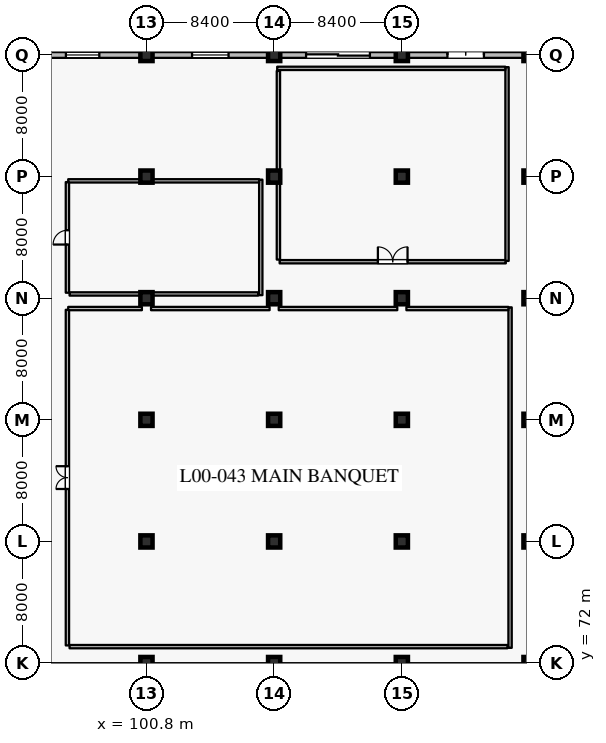
"""IFC4 building model, lengths in metres.
Left out: names, types, materials, properties, quantities, classifications, styles, units other than length and angle.
Written with IfcOpenShell. Run it as: python <this file> out.ifc"""

import sys

from ifc_helpers import new_model, si_unit, direction, frame, frame_2d, origin, origin_2d, place, context, subcontext, project, spatial, rectangle, extrude, element, fill, save


model = new_model("IFC4")
c1 = context("Model", 3, precision=1e-05, world=origin(), true_north=direction((0.0, 1.0)))
c2 = subcontext(c1, "Body", "Model", "MODEL_VIEW")
j1 = project(units=[si_unit("LENGTHUNIT", "METRE"), si_unit("PLANEANGLEUNIT", "RADIAN")], contexts=[c1])
p1 = place(None, origin())
s1 = spatial("IfcSite", under=j1, at=p1, CompositionType="ELEMENT")
p2 = place(p1, origin())
s2 = spatial("IfcBuilding", under=s1, at=p2, CompositionType="ELEMENT")
p3 = place(p2, origin())
s3 = spatial("IfcBuildingStorey", under=s2, at=p3, CompositionType="ELEMENT", Elevation=0.0)
for number, where, z_axis, x_axis in (
    (1, (100.8, 72.0, 0.0), (0.0, 0.0, 1.0), (1.0, 0.0, 0.0)),
    (2, (100.8, 80.0, 0.0), (0.0, 0.0, 1.0), (1.0, 0.0, 0.0)),
    (3, (100.8, 88.0, 0.0), (0.0, 0.0, 1.0), (1.0, 0.0, 0.0)),
    (4, (100.8, 96.0, 0.0), (0.0, 0.0, 1.0), (1.0, 0.0, 0.0)),
    (5, (100.8, 104.0, 0.0), (0.0, 0.0, 1.0), (1.0, 0.0, 0.0)),
    (6, (100.8, 112.0, 0.0), (0.0, 0.0, 1.0), (1.0, 0.0, 0.0)),
    (7, (109.2, 72.0, 0.0), (0.0, 0.0, 1.0), (1.0, 0.0, 0.0)),
    (8, (109.2, 80.0, 0.0), (0.0, 0.0, 1.0), (1.0, 0.0, 0.0)),
    (9, (109.2, 88.0, 0.0), (0.0, 0.0, 1.0), (1.0, 0.0, 0.0)),
    (10, (109.2, 96.0, 0.0), (0.0, 0.0, 1.0), (1.0, 0.0, 0.0)),
    (11, (109.2, 104.0, 0.0), (0.0, 0.0, 1.0), (1.0, 0.0, 0.0)),
    (12, (109.2, 112.0, 0.0), (0.0, 0.0, 1.0), (1.0, 0.0, 0.0)),
    (13, (117.6, 72.0, 0.0), (0.0, 0.0, 1.0), (1.0, 0.0, 0.0)),
    (14, (117.6, 80.0, 0.0), (0.0, 0.0, 1.0), (1.0, 0.0, 0.0)),
    (15, (117.6, 88.0, 0.0), (0.0, 0.0, 1.0), (1.0, 0.0, 0.0)),
    (16, (117.6, 96.0, 0.0), (0.0, 0.0, 1.0), (1.0, 0.0, 0.0)),
    (17, (117.6, 104.0, 0.0), (0.0, 0.0, 1.0), (1.0, 0.0, 0.0)),
    (18, (117.6, 112.0, 0.0), (0.0, 0.0, 1.0), (1.0, 0.0, 0.0)),
    (19, (126.0, 72.0, 0.0), (0.0, 0.0, 1.0), (1.0, 0.0, 0.0)),
    (20, (126.0, 80.0, 0.0), (0.0, 0.0, 1.0), (1.0, 0.0, 0.0)),
    (21, (126.0, 88.0, 0.0), (0.0, 0.0, 1.0), (1.0, 0.0, 0.0)),
    (22, (126.0, 96.0, 0.0), (0.0, 0.0, 1.0), (1.0, 0.0, 0.0)),
    (23, (126.0, 104.0, 0.0), (0.0, 0.0, 1.0), (1.0, 0.0, 0.0)),
    (24, (126.0, 112.0, 0.0), (0.0, 0.0, 1.0), (1.0, 0.0, 0.0)),
):
    element("IfcColumn", number, at=place(p3, frame(where, z_axis=z_axis, x_axis=x_axis)), inside=s3, PredefinedType="COLUMN", context=c2, shape_type="SweptSolid", body=[
        extrude(rectangle(XDim=0.8, YDim=0.8, at=origin_2d()), origin(), (0.0, 0.0, 1.0), 6.0),
    ])
p4 = place(p3, frame((92.8, 112.0, 0.0), z_axis=(0.0, 0.0, 1.0), x_axis=(1.0, 0.0, 0.0)))
e25 = element("IfcWall", 25, at=p4, inside=s3, PredefinedType="SOLIDWALL", context=c2, shape_type="SweptSolid", body=[
    extrude(rectangle(XDim=7.6, YDim=0.38, at=frame_2d((3.8, 0.0))), origin(), (0.0, 0.0, 1.0), 5.0),
])
p5 = place(p4, frame((2.7, 0.0, 1.05)))
e26 = element("IfcOpeningElement", 26, at=p5, cuts=e25, PredefinedType="OPENING", context=c2, shape_type="SweptSolid", body=[
    extrude(rectangle(XDim=2.2, YDim=1.75, at=frame_2d((1.1, 0.875))), frame((0.0, 0.2, 0.0), z_axis=(0.0, -1.0, 0.0), x_axis=(1.0, 0.0, 0.0)), (0.0, 0.0, 1.0), 0.4),
])
p6 = place(p3, frame((101.2, 112.0, 0.0), z_axis=(0.0, 0.0, 1.0), x_axis=(1.0, 0.0, 0.0)))
e27 = element("IfcWall", 27, at=p6, inside=s3, PredefinedType="SOLIDWALL", context=c2, shape_type="SweptSolid", body=[
    extrude(rectangle(XDim=7.6, YDim=0.38, at=frame_2d((3.8, 0.0))), origin(), (0.0, 0.0, 1.0), 5.0),
])
p7 = place(p6, frame((2.6, 0.0, 1.05)))
e28 = element("IfcOpeningElement", 28, at=p7, cuts=e27, PredefinedType="OPENING", context=c2, shape_type="SweptSolid", body=[
    extrude(rectangle(XDim=2.4, YDim=1.65, at=frame_2d((1.2, 0.825))), frame((0.0, 0.2, 0.0), z_axis=(0.0, -1.0, 0.0), x_axis=(1.0, 0.0, 0.0)), (0.0, 0.0, 1.0), 0.4),
])
p8 = place(p3, frame((109.6, 112.0, 0.0), z_axis=(0.0, 0.0, 1.0), x_axis=(1.0, 0.0, 0.0)))
e29 = element("IfcWall", 29, at=p8, inside=s3, PredefinedType="SOLIDWALL", context=c2, shape_type="SweptSolid", body=[
    extrude(rectangle(XDim=7.6, YDim=0.38, at=frame_2d((3.8, 0.0))), origin(), (0.0, 0.0, 1.0), 5.0),
])
p9 = place(p8, frame((1.7, 0.0, 0.0)))
e30 = element("IfcOpeningElement", 30, at=p9, cuts=e29, PredefinedType="OPENING", context=c2, shape_type="SweptSolid", body=[
    extrude(rectangle(XDim=4.2, YDim=4.2, at=frame_2d((2.1, 2.1))), frame((0.0, 0.2, 0.0), z_axis=(0.0, -1.0, 0.0), x_axis=(1.0, 0.0, 0.0)), (0.0, 0.0, 1.0), 0.4),
])
p10 = place(p3, frame((118.0, 112.0, 0.0), z_axis=(0.0, 0.0, 1.0), x_axis=(1.0, 0.0, 0.0)))
e31 = element("IfcWall", 31, at=p10, inside=s3, PredefinedType="SOLIDWALL", context=c2, shape_type="SweptSolid", body=[
    extrude(rectangle(XDim=7.6, YDim=0.38, at=frame_2d((3.8, 0.0))), origin(), (0.0, 0.0, 1.0), 5.0),
])
p11 = place(p10, frame((2.6, 0.0, 0.0)))
e32 = element("IfcOpeningElement", 32, at=p11, cuts=e31, PredefinedType="OPENING", context=c2, shape_type="SweptSolid", body=[
    extrude(rectangle(XDim=2.4, YDim=2.6, at=frame_2d((1.2, 1.3))), frame((0.0, 0.2, 0.0), z_axis=(0.0, -1.0, 0.0), x_axis=(1.0, 0.0, 0.0)), (0.0, 0.0, 1.0), 0.4),
])
p12 = place(p3, frame((95.6, 73.16, 0.0), z_axis=(0.0, 0.0, 1.0), x_axis=(0.0, 1.0, 0.0)))
e33 = element("IfcWall", 33, at=p12, inside=s3, PredefinedType="PARTITIONING", context=c2, shape_type="SweptSolid", body=[
    extrude(rectangle(XDim=22.08, YDim=0.22, at=frame_2d((11.04, 0.0))), origin(), (0.0, 0.0, 1.0), 5.675),
])
p13 = place(p12, frame((10.29, 0.0, 0.0)))
e34 = element("IfcOpeningElement", 34, at=p13, cuts=e33, PredefinedType="OPENING", context=c2, shape_type="SweptSolid", body=[
    extrude(rectangle(XDim=1.5, YDim=2.3, at=frame_2d((0.75, 1.15))), frame((0.0, 0.12, 0.0), z_axis=(0.0, -1.0, 0.0), x_axis=(1.0, 0.0, 0.0)), (0.0, 0.0, 1.0), 0.24),
])
p14 = place(p3, frame((95.74, 73.08, 0.0), z_axis=(0.0, 0.0, 1.0), x_axis=(1.0, 0.0, 0.0)))
e35 = element("IfcWall", 35, at=p14, inside=s3, PredefinedType="PARTITIONING", context=c2, shape_type="SweptSolid", body=[
    extrude(rectangle(XDim=28.81, YDim=0.22, at=frame_2d((14.405, 0.0))), origin(), (0.0, 0.0, 1.0), 5.675),
])
p15 = place(p3, frame((95.6, 96.36, 0.0), z_axis=(0.0, 0.0, 1.0), x_axis=(0.0, 1.0, 0.0)))
e36 = element("IfcWall", 36, at=p15, inside=s3, PredefinedType="PARTITIONING", context=c2, shape_type="SweptSolid", body=[
    extrude(rectangle(XDim=7.28, YDim=0.22, at=frame_2d((3.64, 0.0))), origin(), (0.0, 0.0, 1.0), 5.675),
])
p16 = place(p15, frame((3.17, 0.0, 0.0)))
e37 = element("IfcOpeningElement", 37, at=p16, cuts=e36, PredefinedType="OPENING", context=c2, shape_type="SweptSolid", body=[
    extrude(rectangle(XDim=0.94, YDim=2.15, at=frame_2d((0.47, 1.075))), frame((0.0, 0.12, 0.0), z_axis=(0.0, -1.0, 0.0), x_axis=(1.0, 0.0, 0.0)), (0.0, 0.0, 1.0), 0.24),
])
p17 = place(p3, frame((95.74, 96.28, 0.0), z_axis=(0.0, 0.0, 1.0), x_axis=(1.0, 0.0, 0.0)))
e38 = element("IfcWall", 38, at=p17, inside=s3, PredefinedType="PARTITIONING", context=c2, shape_type="SweptSolid", body=[
    extrude(rectangle(XDim=12.41, YDim=0.22, at=frame_2d((6.205, 0.0))), origin(), (0.0, 0.0, 1.0), 4.85),
])
p18 = place(p3, frame((109.56, 98.4, 0.0), z_axis=(0.0, 0.0, 1.0), x_axis=(1.0, 0.0, 0.0)))
e39 = element("IfcWall", 39, at=p18, inside=s3, PredefinedType="PARTITIONING", context=c2, shape_type="SweptSolid", body=[
    extrude(rectangle(XDim=14.88, YDim=0.22, at=frame_2d((7.44, 0.0))), origin(), (0.0, 0.0, 1.0), 5.675),
])
p19 = place(p18, frame((6.465, 0.0, 0.0)))
e40 = element("IfcOpeningElement", 40, at=p19, cuts=e39, PredefinedType="OPENING", context=c2, shape_type="SweptSolid", body=[
    extrude(rectangle(XDim=1.95, YDim=2.45, at=frame_2d((0.975, 1.225))), frame((0.0, 0.12, 0.0), z_axis=(0.0, -1.0, 0.0), x_axis=(1.0, 0.0, 0.0)), (0.0, 0.0, 1.0), 0.24),
])
p20 = place(p3, frame((109.48, 98.54, 0.0), z_axis=(0.0, 0.0, 1.0), x_axis=(0.0, 1.0, 0.0)))
e41 = element("IfcWall", 41, at=p20, inside=s3, PredefinedType="PARTITIONING", context=c2, shape_type="SweptSolid", body=[
    extrude(rectangle(XDim=12.41, YDim=0.22, at=frame_2d((6.205, 0.0))), origin(), (0.0, 0.0, 1.0), 5.675),
])
p21 = place(p3, frame((124.72, 73.0, 0.0), z_axis=(0.0, 0.0, 1.0), x_axis=(0.0, 1.0, 0.0)))
e42 = element("IfcWall", 42, at=p21, inside=s3, PredefinedType="PARTITIONING", context=c2, shape_type="SweptSolid", body=[
    extrude(rectangle(XDim=22.4, YDim=0.22, at=frame_2d((11.2, 0.0))), origin(), (0.0, 0.0, 1.0), 5.675),
])
p22 = place(p3, frame((95.652, 95.32, 0.0), z_axis=(0.0, 0.0, 1.0), x_axis=(1.0, 0.0, 0.0)))
e43 = element("IfcWall", 43, at=p22, inside=s3, PredefinedType="PARTITIONING", context=c2, shape_type="SweptSolid", body=[
    extrude(rectangle(XDim=4.848, YDim=0.22, at=frame_2d((2.424, 0.0))), origin(), (0.0, 0.0, 1.0), 5.675),
])
p23 = place(p3, frame((101.1, 95.32, 0.0), z_axis=(0.0, 0.0, 1.0), x_axis=(1.0, 0.0, 0.0)))
e44 = element("IfcWall", 44, at=p23, inside=s3, PredefinedType="PARTITIONING", context=c2, shape_type="SweptSolid", body=[
    extrude(rectangle(XDim=7.8, YDim=0.22, at=frame_2d((3.9, 0.0))), origin(), (0.0, 0.0, 1.0), 5.675),
])
p24 = place(p3, frame((109.5, 95.32, 0.0), z_axis=(0.0, 0.0, 1.0), x_axis=(1.0, 0.0, 0.0)))
e45 = element("IfcWall", 45, at=p24, inside=s3, PredefinedType="PARTITIONING", context=c2, shape_type="SweptSolid", body=[
    extrude(rectangle(XDim=7.8, YDim=0.22, at=frame_2d((3.9, 0.0))), origin(), (0.0, 0.0, 1.0), 5.675),
])
p25 = place(p3, frame((117.9, 95.32, 0.0), z_axis=(0.0, 0.0, 1.0), x_axis=(1.0, 0.0, 0.0)))
e46 = element("IfcWall", 46, at=p25, inside=s3, PredefinedType="PARTITIONING", context=c2, shape_type="SweptSolid", body=[
    extrude(rectangle(XDim=6.71, YDim=0.22, at=frame_2d((3.355, 0.0))), origin(), (0.0, 0.0, 1.0), 5.675),
])
p26 = place(p3, frame((108.32, 96.2, 0.0), z_axis=(0.0, 0.0, 1.0), x_axis=(0.0, 1.0, 0.0)))
e47 = element("IfcWall", 47, at=p26, inside=s3, PredefinedType="PARTITIONING", context=c2, shape_type="SweptSolid", body=[
    extrude(rectangle(XDim=7.6, YDim=0.22, at=frame_2d((3.8, 0.0))), origin(), (0.0, 0.0, 1.0), 5.675),
])
p27 = place(p3, frame((95.652, 103.72, 0.0), z_axis=(0.0, 0.0, 1.0), x_axis=(1.0, 0.0, 0.0)))
e48 = element("IfcWall", 48, at=p27, inside=s3, PredefinedType="PARTITIONING", context=c2, shape_type="SweptSolid", body=[
    extrude(rectangle(XDim=4.748, YDim=0.22, at=frame_2d((2.374, 0.0))), origin(), (0.0, 0.0, 1.0), 4.85),
])
p28 = place(p3, frame((101.2, 103.72, 0.0), z_axis=(0.0, 0.0, 1.0), x_axis=(1.0, 0.0, 0.0)))
e49 = element("IfcWall", 49, at=p28, inside=s3, PredefinedType="PARTITIONING", context=c2, shape_type="SweptSolid", body=[
    extrude(rectangle(XDim=7.01, YDim=0.22, at=frame_2d((3.505, 0.0))), origin(), (0.0, 0.0, 1.0), 4.85),
])
p29 = place(p3, frame((124.52, 98.452, 0.0), z_axis=(0.0, 0.0, 1.0), x_axis=(0.0, 1.0, 0.0)))
e50 = element("IfcWall", 50, at=p29, inside=s3, PredefinedType="PARTITIONING", context=c2, shape_type="SweptSolid", body=[
    extrude(rectangle(XDim=12.748, YDim=0.22, at=frame_2d((6.374, 0.0))), origin(), (0.0, 0.0, 1.0), 5.675),
])
p30 = place(p3, frame((109.4, 111.12, 0.0), z_axis=(0.0, 0.0, 1.0), x_axis=(1.0, 0.0, 0.0)))
e51 = element("IfcWall", 51, at=p30, inside=s3, PredefinedType="PARTITIONING", context=c2, shape_type="SweptSolid", body=[
    extrude(rectangle(XDim=15.01, YDim=0.22, at=frame_2d((7.505, 0.0))), origin(), (0.0, 0.0, 1.0), 5.675),
])
p31 = place(p5, origin())
e52 = element("IfcWindow", 52, at=p31, inside=s3, PartitioningType="DOUBLE_PANEL_VERTICAL", PredefinedType="WINDOW", context=c2, shape_type="SweptSolid", body=[
    extrude(rectangle(XDim=2.2, YDim=1.75, at=frame_2d((1.1, 0.875))), frame((0.0, 0.03, 0.0), z_axis=(0.0, -1.0, 0.0), x_axis=(1.0, 0.0, 0.0)), (0.0, 0.0, 1.0), 0.06),
])
fill(e26, e52)
p32 = place(p7, origin())
e53 = element("IfcWindow", 53, at=p32, inside=s3, PartitioningType="DOUBLE_PANEL_VERTICAL", PredefinedType="WINDOW", context=c2, shape_type="SweptSolid", body=[
    extrude(rectangle(XDim=2.4, YDim=1.65, at=frame_2d((1.2, 0.825))), frame((0.0, 0.03, 0.0), z_axis=(0.0, -1.0, 0.0), x_axis=(1.0, 0.0, 0.0)), (0.0, 0.0, 1.0), 0.06),
])
fill(e28, e53)
p33 = place(p9, origin())
e54 = element("IfcDoor", 54, at=p33, inside=s3, OperationType="ROLLINGUP", PredefinedType="GATE", context=c2, shape_type="SweptSolid", body=[
    extrude(rectangle(XDim=4.2, YDim=4.2, at=frame_2d((2.1, 2.1))), frame((0.0, 0.025, 0.0), z_axis=(0.0, -1.0, 0.0), x_axis=(1.0, 0.0, 0.0)), (0.0, 0.0, 1.0), 0.05),
])
fill(e30, e54)
p34 = place(p11, origin())
e55 = element("IfcDoor", 55, at=p34, inside=s3, OperationType="DOUBLE_DOOR_SINGLE_SWING", PredefinedType="DOOR", context=c2, shape_type="SweptSolid", body=[
    extrude(rectangle(XDim=2.4, YDim=2.6, at=frame_2d((1.2, 1.3))), frame((0.0, 0.025, 0.0), z_axis=(0.0, -1.0, 0.0), x_axis=(1.0, 0.0, 0.0)), (0.0, 0.0, 1.0), 0.05),
])
fill(e32, e55)
p35 = place(p13, origin())
e56 = element("IfcDoor", 56, at=p35, inside=s3, OperationType="DOUBLE_DOOR_SINGLE_SWING", PredefinedType="DOOR", context=c2, shape_type="SweptSolid", body=[
    extrude(rectangle(XDim=1.5, YDim=2.3, at=frame_2d((0.75, 1.15))), frame((0.0, 0.025, 0.0), z_axis=(0.0, -1.0, 0.0), x_axis=(1.0, 0.0, 0.0)), (0.0, 0.0, 1.0), 0.05),
])
fill(e34, e56)
p36 = place(p16, origin())
e57 = element("IfcDoor", 57, at=p36, inside=s3, OperationType="SINGLE_SWING_LEFT", PredefinedType="DOOR", context=c2, shape_type="SweptSolid", body=[
    extrude(rectangle(XDim=0.94, YDim=2.15, at=frame_2d((0.47, 1.075))), frame((0.0, 0.025, 0.0), z_axis=(0.0, -1.0, 0.0), x_axis=(1.0, 0.0, 0.0)), (0.0, 0.0, 1.0), 0.05),
])
fill(e37, e57)
p37 = place(p19, origin())
e58 = element("IfcDoor", 58, at=p37, inside=s3, OperationType="DOUBLE_DOOR_SINGLE_SWING", PredefinedType="DOOR", context=c2, shape_type="SweptSolid", body=[
    extrude(rectangle(XDim=1.95, YDim=2.45, at=frame_2d((0.975, 1.225))), frame((0.0, 0.025, 0.0), z_axis=(0.0, -1.0, 0.0), x_axis=(1.0, 0.0, 0.0)), (0.0, 0.0, 1.0), 0.05),
])
fill(e40, e58)
save(model, sys.argv[1])
